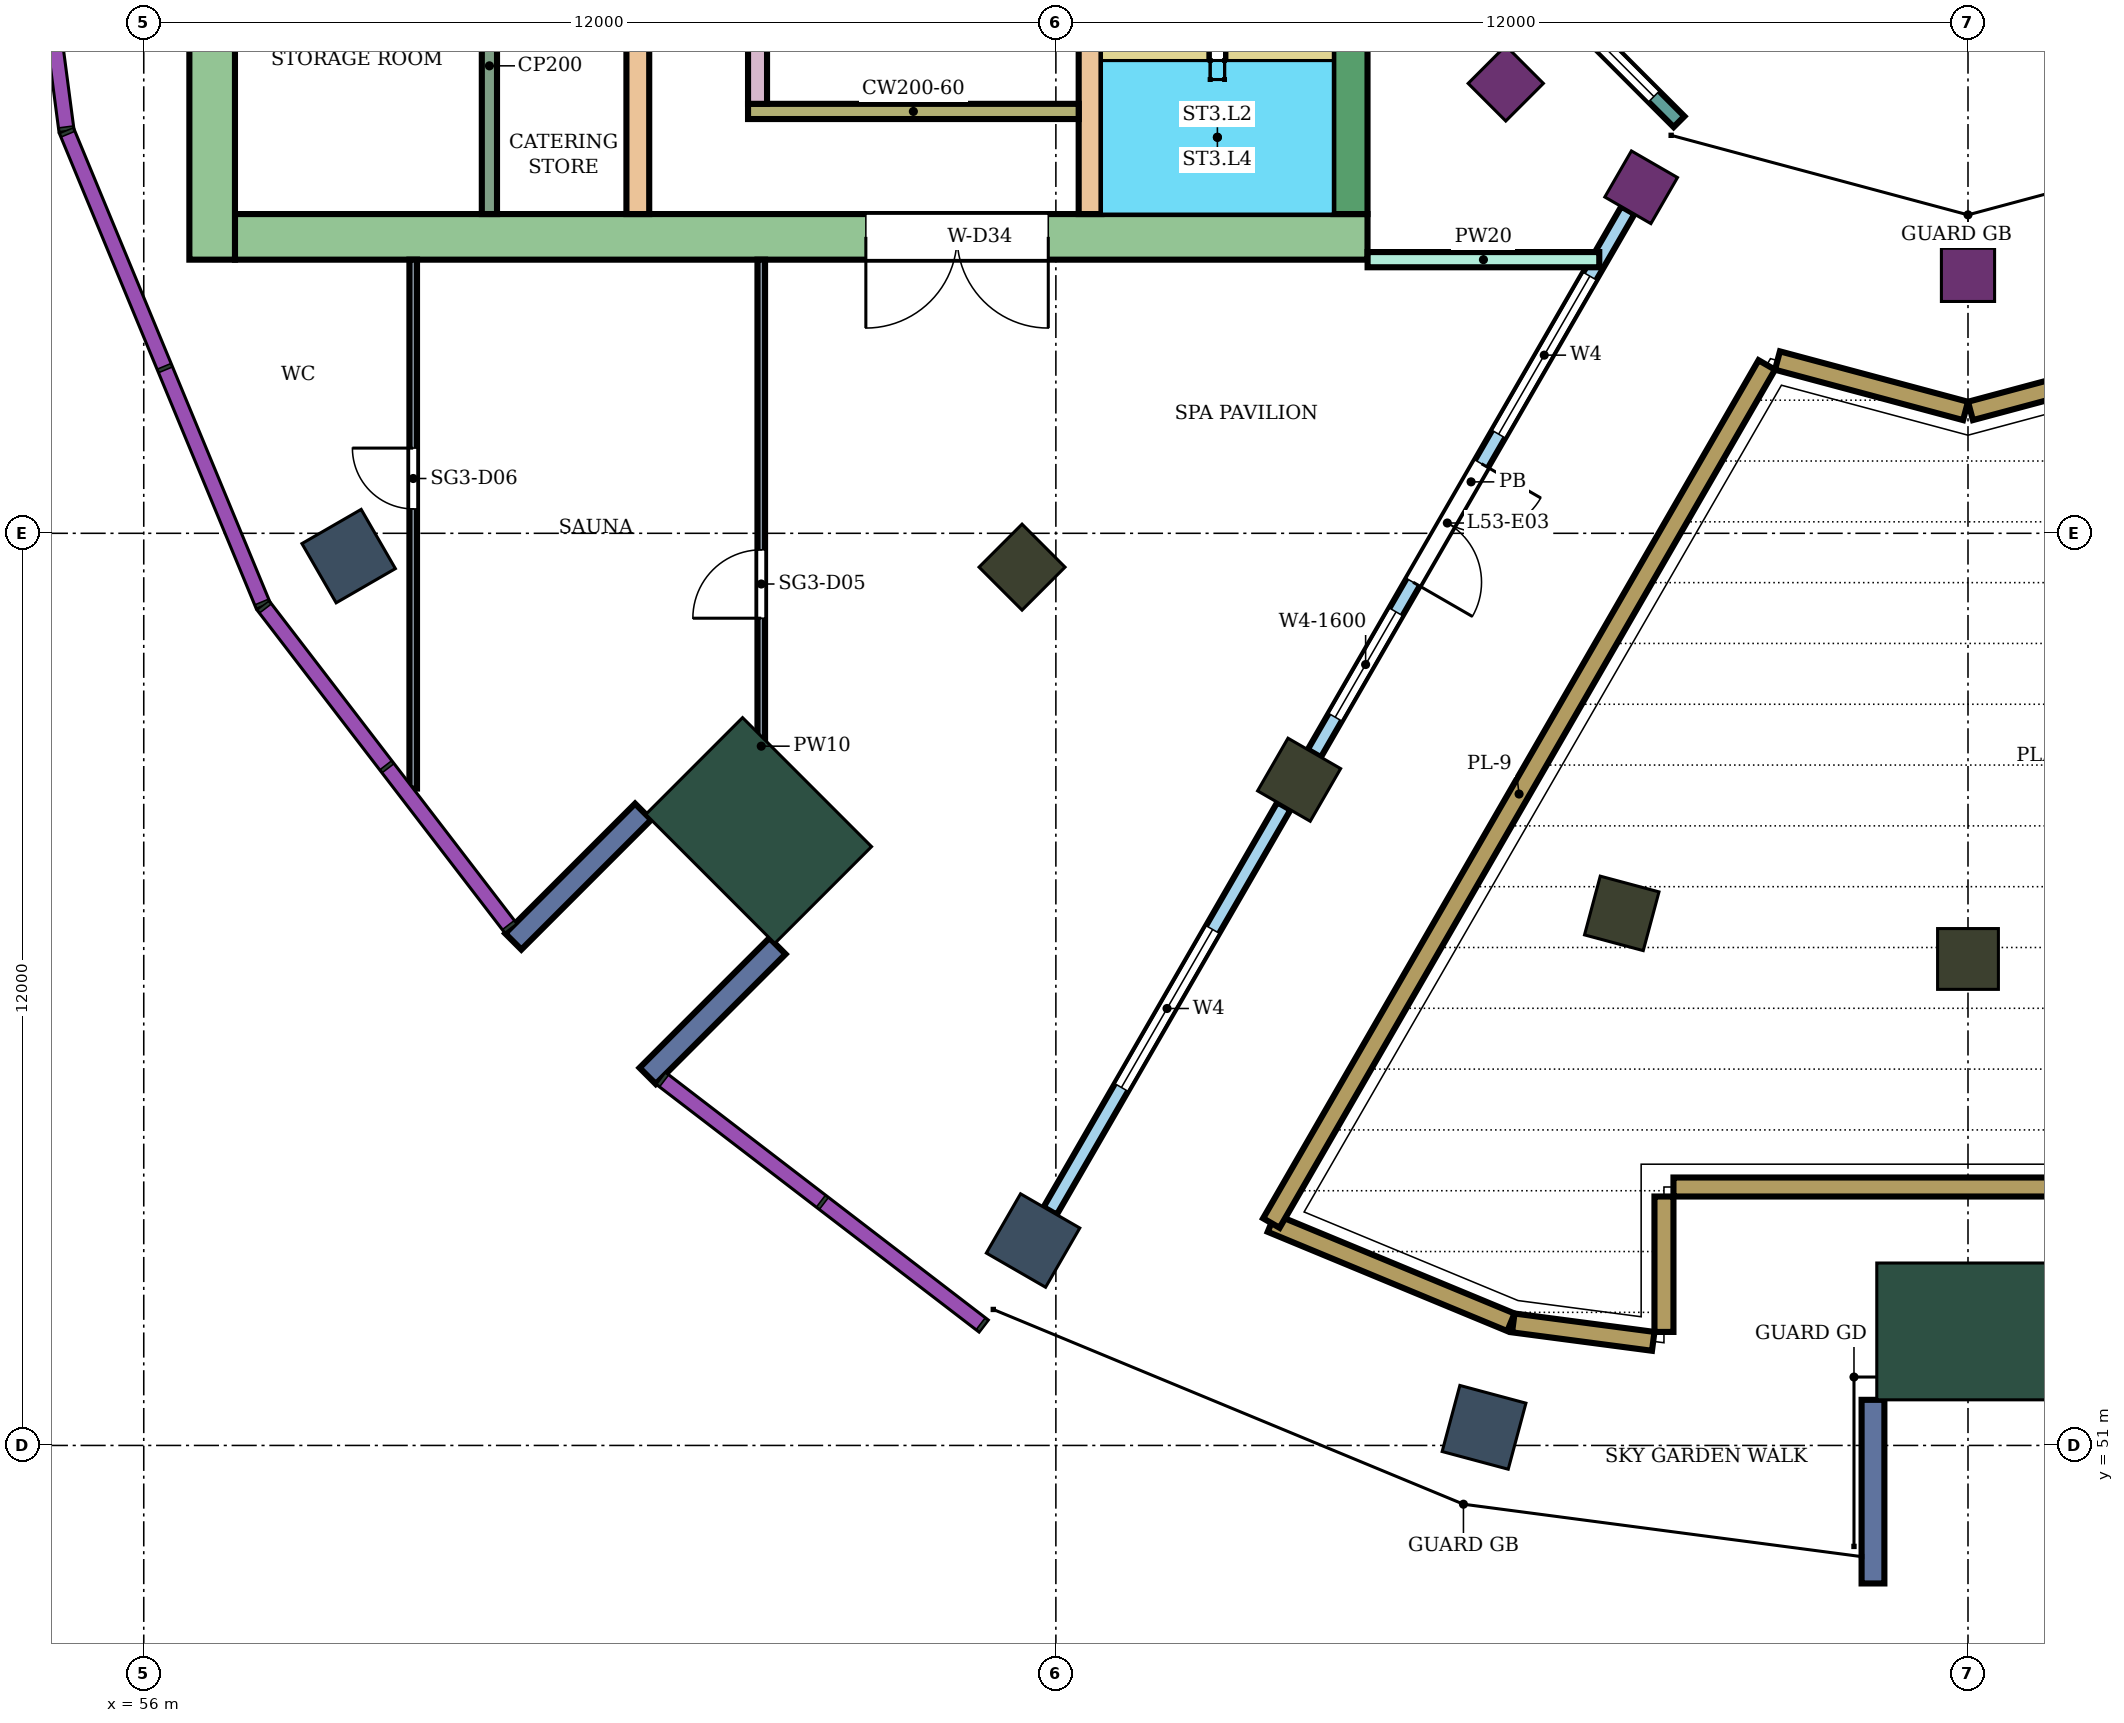
"""IFC4 building model, lengths in metres.
Left out: names, types, materials, properties, quantities, classifications, styles, units other than length and angle.
Written with IfcOpenShell. Run it as: python <this file> out.ifc"""

import sys

from ifc_helpers import new_model, si_unit, direction, frame, frame_2d, origin, origin_2d, place, context, subcontext, project, spatial, rectangle, extrude, element, fill, save


model = new_model("IFC4")
c1 = context("Model", 3, precision=1e-05, world=origin(), true_north=direction((0.0, 1.0)))
c2 = subcontext(c1, "Body", "Model", "MODEL_VIEW")
j1 = project(units=[si_unit("LENGTHUNIT", "METRE"), si_unit("PLANEANGLEUNIT", "RADIAN")], contexts=[c1])
p1 = place(None, origin())
s1 = spatial("IfcSite", under=j1, at=p1, CompositionType="ELEMENT")
p2 = place(p1, origin())
s2 = spatial("IfcBuilding", under=s1, at=p2, CompositionType="ELEMENT")
p3 = place(p2, frame((0.0, 0.0, 229.3)))
s3 = spatial("IfcBuildingStorey", under=s2, at=p3, CompositionType="ELEMENT", Elevation=229.3)
for number, where, z_axis, x_axis in (
    (1, (58.696, 62.7, 0.0), (0.0, 0.0, 1.0), (-0.866, -0.5, 0.0)),
    (2, (67.7, 53.696, 0.0), (0.0, 0.0, 1.0), (-0.5, -0.866, 0.0)),
    (3, (73.633, 51.238, 0.0), (0.0, 0.0, 1.0), (-0.259, -0.966, 0.0)),
):
    element("IfcColumn", number, at=place(p3, frame(where, z_axis=z_axis, x_axis=x_axis)), inside=s3, PredefinedType="COLUMN", context=c2, shape_type="SweptSolid", body=[
        extrude(rectangle(XDim=0.9, YDim=0.9, at=origin_2d()), origin(), (0.0, 0.0, 1.0), 8.0),
    ])
for number, where, z_axis, x_axis in (
    (4, (67.555, 62.555, 0.0), (0.0, 0.0, 1.0), (-0.707, -0.707, 0.0)),
    (5, (71.2, 59.758, 0.0), (0.0, 0.0, 1.0), (-0.5, -0.866, 0.0)),
    (6, (75.445, 58.0, 0.0), (0.0, 0.0, 1.0), (-0.259, -0.966, 0.0)),
    (7, (80.0, 57.4, 0.0), (0.0, 0.0, 1.0), (0.0, -1.0, 0.0)),
):
    element("IfcColumn", number, at=place(p3, frame(where, z_axis=z_axis, x_axis=x_axis)), inside=s3, PredefinedType="COLUMN", context=c2, shape_type="SweptSolid", body=[
        extrude(rectangle(XDim=0.8, YDim=0.8, at=origin_2d()), origin(), (0.0, 0.0, 1.0), 8.0),
    ])
for number, where, z_axis, x_axis in (
    (8, (73.919, 68.919, 0.0), (0.0, 0.0, 1.0), (-0.707, -0.707, 0.0)),
    (9, (75.7, 67.552, 0.0), (0.0, 0.0, 1.0), (-0.5, -0.866, 0.0)),
    (10, (80.0, 66.4, 0.0), (0.0, 0.0, 1.0), (0.0, -1.0, 0.0)),
):
    element("IfcColumn", number, at=place(p3, frame(where, z_axis=z_axis, x_axis=x_axis)), inside=s3, PredefinedType="COLUMN", context=c2, shape_type="SweptSolid", body=[
        extrude(rectangle(XDim=0.7, YDim=0.7, at=origin_2d()), origin(), (0.0, 0.0, 1.0), 8.0),
    ])
for number, where, z_axis, x_axis in (
    (11, (64.09, 59.09, 0.0), (0.0, 0.0, 1.0), (-0.707, -0.707, 0.0)),
    (12, (80.0, 52.5, 0.0), (0.0, 0.0, 1.0), (0.0, -1.0, 0.0)),
):
    element("IfcColumn", number, at=place(p3, frame(where, z_axis=z_axis, x_axis=x_axis)), inside=s3, PredefinedType="COLUMN", context=c2, shape_type="SweptSolid", body=[
        extrude(rectangle(XDim=1.8, YDim=2.4, at=origin_2d()), origin(), (0.0, 0.0, 1.0), 8.0),
    ])
p4 = place(p3, frame((72.1, 66.9, 0.0), z_axis=(0.0, 0.0, 1.0), x_axis=(-1.0, 0.0, 0.0)))
e13 = element("IfcWall", 13, at=p4, inside=s3, PredefinedType="SHEAR", context=c2, shape_type="SweptSolid", body=[
    extrude(rectangle(XDim=14.9, YDim=0.6, at=frame_2d((7.45, 0.0))), origin(), (0.0, 0.0, 1.0), 7.68),
])
p5 = place(p4, frame((4.2, 0.0, 0.0)))
e14 = element("IfcOpeningElement", 14, at=p5, cuts=e13, PredefinedType="OPENING", context=c2, shape_type="SweptSolid", body=[
    extrude(rectangle(XDim=2.4, YDim=2.4, at=frame_2d((1.2, 1.2))), frame((0.0, 0.31, 0.0), z_axis=(0.0, -1.0, 0.0), x_axis=(1.0, 0.0, 0.0)), (0.0, 0.0, 1.0), 0.62),
])
p6 = place(p3, frame((71.875, 75.0, 0.0), z_axis=(0.0, 0.0, 1.0), x_axis=(0.0, -1.0, 0.0)))
e15 = element("IfcWall", 15, at=p6, inside=s3, PredefinedType="SHEAR", context=c2, shape_type="SweptSolid", body=[
    extrude(rectangle(XDim=7.8, YDim=0.45, at=frame_2d((3.9, 0.0))), origin(), (0.0, 0.0, 1.0), 7.68),
])
p7 = place(p3, frame((56.9, 83.4, 0.0), z_axis=(0.0, 0.0, 1.0), x_axis=(0.0, -1.0, 0.0)))
e16 = element("IfcWall", 16, at=p7, inside=s3, PredefinedType="SHEAR", context=c2, shape_type="SweptSolid", body=[
    extrude(rectangle(XDim=16.8, YDim=0.6, at=frame_2d((8.4, 0.0))), origin(), (0.0, 0.0, 1.0), 7.68),
])
p8 = place(p3, frame((68.45, 75.0, 0.0), z_axis=(0.0, 0.0, 1.0), x_axis=(0.0, -1.0, 0.0)))
e17 = element("IfcWall", 17, at=p8, inside=s3, PredefinedType="SHEAR", context=c2, shape_type="SweptSolid", body=[
    extrude(rectangle(XDim=7.8, YDim=0.3, at=frame_2d((3.9, 0.0))), origin(), (0.0, 0.0, 1.0), 7.68),
])
p9 = place(p8, frame((1.85, 0.0, 0.0)))
e18 = element("IfcOpeningElement", 18, at=p9, cuts=e17, PredefinedType="OPENING", context=c2, shape_type="SweptSolid", body=[
    extrude(rectangle(XDim=0.9, YDim=2.1, at=frame_2d((0.45, 1.05))), frame((0.0, 0.16, 0.0), z_axis=(0.0, -1.0, 0.0), x_axis=(1.0, 0.0, 0.0)), (0.0, 0.0, 1.0), 0.32),
])
p10 = place(p3, frame((68.3, 68.55, 0.0), z_axis=(0.0, 0.0, 1.0), x_axis=(-1.0, 0.0, 0.0)))
e19 = element("IfcWall", 19, at=p10, inside=s3, PredefinedType="SHEAR", context=c2, shape_type="SweptSolid", body=[
    extrude(rectangle(XDim=4.35, YDim=0.2, at=frame_2d((2.175, 0.0))), origin(), (0.0, 0.0, 1.0), 7.68),
])
p11 = place(p3, frame((64.075, 71.45, 0.0), z_axis=(0.0, 0.0, 1.0), x_axis=(0.0, -1.0, 0.0)))
e20 = element("IfcWall", 20, at=p11, inside=s3, PredefinedType="SHEAR", context=c2, shape_type="SweptSolid", body=[
    extrude(rectangle(XDim=2.8, YDim=0.25, at=frame_2d((1.4, 0.0))), origin(), (0.0, 0.0, 1.0), 7.68),
])
p12 = place(p11, frame((0.95, 0.0, 0.0)))
e21 = element("IfcOpeningElement", 21, at=p12, cuts=e20, PredefinedType="OPENING", context=c2, shape_type="SweptSolid", body=[
    extrude(rectangle(XDim=0.9, YDim=2.1, at=frame_2d((0.45, 1.05))), frame((0.0, 0.135, 0.0), z_axis=(0.0, -1.0, 0.0), x_axis=(1.0, 0.0, 0.0)), (0.0, 0.0, 1.0), 0.27),
])
p13 = place(p3, frame((62.5, 71.4, 0.0), z_axis=(0.0, 0.0, 1.0), x_axis=(0.0, -1.0, 0.0)))
e22 = element("IfcWall", 22, at=p13, inside=s3, PredefinedType="SHEAR", context=c2, shape_type="SweptSolid", body=[
    extrude(rectangle(XDim=4.2, YDim=0.3, at=frame_2d((2.1, 0.0))), origin(), (0.0, 0.0, 1.0), 7.68),
])
for number, where, z_axis, x_axis in (
    (23, (62.57, 59.338, 0.0), (0.0, 0.0, 1.0), (-0.707, -0.707, 0.0)),
    (24, (64.338, 57.57, 0.0), (0.0, 0.0, 1.0), (-0.707, -0.707, 0.0)),
    (25, (78.75, 51.6, 0.0), (0.0, 0.0, 1.0), (0.0, -1.0, 0.0)),
):
    element("IfcWall", number, at=place(p3, frame(where, z_axis=z_axis, x_axis=x_axis)), inside=s3, PredefinedType="NOTDEFINED", context=c2, shape_type="SweptSolid", body=[
        extrude(rectangle(XDim=2.416, YDim=0.3, at=frame_2d((1.208, 0.0))), origin(), (0.0, 0.0, 1.0), 8.0),
    ])
p14 = place(p3, frame((73.415, 71.198, 0.0), z_axis=(0.0, 0.0, 1.0), x_axis=(0.707106781187, -0.707106781187, 0.0)))
e26 = element("IfcWall", 26, at=p14, inside=s3, PredefinedType="NOTDEFINED", context=c2, shape_type="SweptSolid", body=[
    extrude(rectangle(XDim=3.936, YDim=0.2, at=frame_2d((1.968, 0.0))), origin(), (0.0, 0.0, 1.0), 8.0),
])
p15 = place(p14, frame((0.468, 0.0, 0.9)))
e27 = element("IfcOpeningElement", 27, at=p15, cuts=e26, PredefinedType="OPENING", context=c2, shape_type="SweptSolid", body=[
    extrude(rectangle(XDim=3.0, YDim=2.3, at=frame_2d((1.5, 1.15))), frame((0.0, 0.11, 0.0), z_axis=(0.0, -1.0, 0.0), x_axis=(1.0, 0.0, 0.0)), (0.0, 0.0, 1.0), 0.22),
])
p16 = place(p3, frame((70.835, 53.926, 0.0), z_axis=(0.0, 0.0, 1.0), x_axis=(0.923871147788, -0.38270367425, 0.0)))
e28 = element("IfcWall", 28, at=p16, inside=s3, PredefinedType="USERDEFINED", context=c2, shape_type="SweptSolid", body=[
    extrude(rectangle(XDim=3.411, YDim=0.25, at=frame_2d((1.706, 0.0))), origin(), (0.0, 0.0, 1.0), 0.6),
])
p17 = place(p3, frame((74.018, 52.612, 0.0), z_axis=(0.0, 0.0, 1.0), x_axis=(0.991436829887, -0.130587182926, 0.0)))
e29 = element("IfcWall", 29, at=p17, inside=s3, PredefinedType="USERDEFINED", context=c2, shape_type="SweptSolid", body=[
    extrude(rectangle(XDim=1.856, YDim=0.25, at=frame_2d((0.928, 0.0))), origin(), (0.0, 0.0, 1.0), 0.6),
])
p18 = place(p3, frame((76.0, 52.493, 0.0), z_axis=(0.0, 0.0, 1.0), x_axis=(0.0, 1.0, 0.0)))
e30 = element("IfcWall", 30, at=p18, inside=s3, PredefinedType="USERDEFINED", context=c2, shape_type="SweptSolid", body=[
    extrude(rectangle(XDim=1.781, YDim=0.25, at=frame_2d((0.891, 0.0))), origin(), (0.0, 0.0, 1.0), 0.6),
])
p19 = place(p3, frame((76.125, 54.4, 0.0), z_axis=(0.0, 0.0, 1.0), x_axis=(1.0, 0.0, 0.0)))
e31 = element("IfcWall", 31, at=p19, inside=s3, PredefinedType="USERDEFINED", context=c2, shape_type="SweptSolid", body=[
    extrude(rectangle(XDim=7.75, YDim=0.25, at=frame_2d((3.875, 0.0))), origin(), (0.0, 0.0, 1.0), 0.6),
])
for number, where, z_axis, x_axis in (
    (32, (82.507, 65.273, 0.0), (0.0, 0.0, 1.0), (-0.966, -0.259, 0.0)),
    (33, (79.968, 64.61, 0.0), (0.0, 0.0, 1.0), (-0.966, 0.259, 0.0)),
):
    element("IfcWall", number, at=place(p3, frame(where, z_axis=z_axis, x_axis=x_axis)), inside=s3, PredefinedType="USERDEFINED", context=c2, shape_type="SweptSolid", body=[
        extrude(rectangle(XDim=2.562, YDim=0.25, at=frame_2d((1.281, 0.0))), origin(), (0.0, 0.0, 1.0), 0.6),
    ])
p20 = place(p3, frame((77.353, 65.215, 0.0), z_axis=(0.0, 0.0, 1.0), x_axis=(-0.499990498062, -0.866030889661, 0.0)))
e34 = element("IfcWall", 34, at=p20, inside=s3, PredefinedType="USERDEFINED", context=c2, shape_type="SweptSolid", body=[
    extrude(rectangle(XDim=13.035, YDim=0.25, at=frame_2d((6.518, 0.0))), origin(), (0.0, 0.0, 1.0), 0.6),
])
p21 = place(p3, frame((75.525, 67.249, 0.0), z_axis=(0.0, 0.0, 1.0), x_axis=(-0.499996545922, -0.866027397988, 0.0)))
e35 = element("IfcWall", 35, at=p21, inside=s3, PredefinedType="NOTDEFINED", context=c2, shape_type="SweptSolid", body=[
    extrude(rectangle(XDim=8.25, YDim=0.2, at=frame_2d((4.125, 0.0))), origin(), (0.0, 0.0, 1.0), 8.0),
])
p22 = place(p21, frame((1.0, 0.0, 0.3)))
e36 = element("IfcOpeningElement", 36, at=p22, cuts=e35, PredefinedType="OPENING", context=c2, shape_type="SweptSolid", body=[
    extrude(rectangle(XDim=2.4, YDim=3.6, at=frame_2d((1.2, 1.8))), frame((0.0, 0.11, 0.0), z_axis=(0.0, -1.0, 0.0), x_axis=(1.0, 0.0, 0.0)), (0.0, 0.0, 1.0), 0.22),
])
p23 = place(p21, frame((3.85, 0.0, 0.0)))
e37 = element("IfcOpeningElement", 37, at=p23, cuts=e35, PredefinedType="OPENING", context=c2, shape_type="SweptSolid", body=[
    extrude(rectangle(XDim=1.8, YDim=2.4, at=frame_2d((0.9, 1.2))), frame((0.0, 0.11, 0.0), z_axis=(0.0, -1.0, 0.0), x_axis=(1.0, 0.0, 0.0)), (0.0, 0.0, 1.0), 0.22),
])
p24 = place(p21, frame((6.1, 0.0, 0.3)))
e38 = element("IfcOpeningElement", 38, at=p24, cuts=e35, PredefinedType="OPENING", context=c2, shape_type="SweptSolid", body=[
    extrude(rectangle(XDim=1.6, YDim=3.6, at=frame_2d((0.8, 1.8))), frame((0.0, 0.11, 0.0), z_axis=(0.0, -1.0, 0.0), x_axis=(1.0, 0.0, 0.0)), (0.0, 0.0, 1.0), 0.22),
])
p25 = place(p3, frame((71.0, 59.412, 0.0), z_axis=(0.0, 0.0, 1.0), x_axis=(-0.499985903289, -0.866033542371, 0.0)))
e39 = element("IfcWall", 39, at=p25, inside=s3, PredefinedType="NOTDEFINED", context=c2, shape_type="SweptSolid", body=[
    extrude(rectangle(XDim=6.15, YDim=0.2, at=frame_2d((3.075, 0.0))), origin(), (0.0, 0.0, 1.0), 8.0),
])
p26 = place(p25, frame((1.875, 0.0, 0.3)))
e40 = element("IfcOpeningElement", 40, at=p26, cuts=e39, PredefinedType="OPENING", context=c2, shape_type="SweptSolid", body=[
    extrude(rectangle(XDim=2.4, YDim=3.6, at=frame_2d((1.2, 1.8))), frame((0.0, 0.11, 0.0), z_axis=(0.0, -1.0, 0.0), x_axis=(1.0, 0.0, 0.0)), (0.0, 0.0, 1.0), 0.22),
])
p27 = place(p3, frame((72.101, 66.6, 0.0), z_axis=(0.0, 0.0, 1.0), x_axis=(1.0, 0.0, 0.0)))
e41 = element("IfcWall", 41, at=p27, inside=s3, PredefinedType="PARTITIONING", context=c2, shape_type="SweptSolid", body=[
    extrude(rectangle(XDim=3.048, YDim=0.2, at=frame_2d((1.524, 0.0))), origin(), (0.0, 0.0, 1.0), 7.55),
])
p28 = place(p3, frame((59.545, 59.642, 0.0), z_axis=(0.0, 0.0, 1.0), x_axis=(0.0, 1.0, 0.0)))
e42 = element("IfcWall", 42, at=p28, inside=s3, PredefinedType="PARTITIONING", context=c2, shape_type="SweptSolid", body=[
    extrude(rectangle(XDim=6.958, YDim=0.1, at=frame_2d((3.479, 0.0))), origin(), (0.0, 0.0, 1.0), 7.55),
])
p29 = place(p28, frame((3.679, 0.0, 0.0)))
e43 = element("IfcOpeningElement", 43, at=p29, cuts=e42, PredefinedType="OPENING", context=c2, shape_type="SweptSolid", body=[
    extrude(rectangle(XDim=0.8, YDim=2.1, at=frame_2d((0.4, 1.05))), frame((0.0, 0.06, 0.0), z_axis=(0.0, -1.0, 0.0), x_axis=(1.0, 0.0, 0.0)), (0.0, 0.0, 1.0), 0.12),
])
p30 = place(p3, frame((64.124, 58.066, 0.0), z_axis=(0.0, 0.0, 1.0), x_axis=(0.0, 1.0, 0.0)))
e44 = element("IfcWall", 44, at=p30, inside=s3, PredefinedType="PARTITIONING", context=c2, shape_type="SweptSolid", body=[
    extrude(rectangle(XDim=8.534, YDim=0.1, at=frame_2d((4.267, 0.0))), origin(), (0.0, 0.0, 1.0), 7.55),
])
p31 = place(p30, frame((3.817, 0.0, 0.0)))
e45 = element("IfcOpeningElement", 45, at=p31, cuts=e44, PredefinedType="OPENING", context=c2, shape_type="SweptSolid", body=[
    extrude(rectangle(XDim=0.9, YDim=2.1, at=frame_2d((0.45, 1.05))), frame((0.0, 0.06, 0.0), z_axis=(0.0, -1.0, 0.0), x_axis=(1.0, 0.0, 0.0)), (0.0, 0.0, 1.0), 0.12),
])
p32 = place(p3, frame((60.548, 71.1, 0.0), z_axis=(0.0, 0.0, 1.0), x_axis=(0.0, -1.0, 0.0)))
e46 = element("IfcWall", 46, at=p32, inside=s3, PredefinedType="PARTITIONING", context=c2, shape_type="SweptSolid", body=[
    extrude(rectangle(XDim=3.9, YDim=0.2, at=frame_2d((1.95, 0.0))), origin(), (0.0, 0.0, 1.0), 7.68),
])
p33 = place(p15, origin())
e47 = element("IfcWindow", 47, at=p33, inside=s3, PartitioningType="SINGLE_PANEL", PredefinedType="WINDOW", context=c2, shape_type="SweptSolid", body=[
    extrude(rectangle(XDim=3.0, YDim=2.3, at=frame_2d((1.5, 1.15))), frame((0.0, 0.03, 0.0), z_axis=(0.0, -1.0, 0.0), x_axis=(1.0, 0.0, 0.0)), (0.0, 0.0, 1.0), 0.06),
])
fill(e27, e47)
p34 = place(p22, origin())
e48 = element("IfcWindow", 48, at=p34, inside=s3, PartitioningType="SINGLE_PANEL", PredefinedType="WINDOW", context=c2, shape_type="SweptSolid", body=[
    extrude(rectangle(XDim=2.4, YDim=3.6, at=frame_2d((1.2, 1.8))), frame((0.0, 0.03, 0.0), z_axis=(0.0, -1.0, 0.0), x_axis=(1.0, 0.0, 0.0)), (0.0, 0.0, 1.0), 0.06),
])
fill(e36, e48)
p35 = place(p23, origin())
e49 = element("IfcDoor", 49, at=p35, inside=s3, OperationType="DOUBLE_DOOR_SINGLE_SWING", PredefinedType="DOOR", context=c2, shape_type="SweptSolid", body=[
    extrude(rectangle(XDim=1.8, YDim=2.4, at=frame_2d((0.9, 1.2))), frame((0.0, 0.025, 0.0), z_axis=(0.0, -1.0, 0.0), x_axis=(1.0, 0.0, 0.0)), (0.0, 0.0, 1.0), 0.05),
])
fill(e37, e49)
p36 = place(p24, origin())
e50 = element("IfcWindow", 50, at=p36, inside=s3, PartitioningType="SINGLE_PANEL", PredefinedType="WINDOW", context=c2, shape_type="SweptSolid", body=[
    extrude(rectangle(XDim=1.6, YDim=3.6, at=frame_2d((0.8, 1.8))), frame((0.0, 0.03, 0.0), z_axis=(0.0, -1.0, 0.0), x_axis=(1.0, 0.0, 0.0)), (0.0, 0.0, 1.0), 0.06),
])
fill(e38, e50)
p37 = place(p26, origin())
e51 = element("IfcWindow", 51, at=p37, inside=s3, PartitioningType="SINGLE_PANEL", PredefinedType="WINDOW", context=c2, shape_type="SweptSolid", body=[
    extrude(rectangle(XDim=2.4, YDim=3.6, at=frame_2d((1.2, 1.8))), frame((0.0, 0.03, 0.0), z_axis=(0.0, -1.0, 0.0), x_axis=(1.0, 0.0, 0.0)), (0.0, 0.0, 1.0), 0.06),
])
fill(e40, e51)
p38 = place(p31, origin())
e52 = element("IfcDoor", 52, at=p38, inside=s3, OperationType="SINGLE_SWING_LEFT", PredefinedType="DOOR", context=c2, shape_type="SweptSolid", body=[
    extrude(rectangle(XDim=0.9, YDim=2.1, at=frame_2d((0.45, 1.05))), frame((0.0, 0.025, 0.0), z_axis=(0.0, -1.0, 0.0), x_axis=(1.0, 0.0, 0.0)), (0.0, 0.0, 1.0), 0.05),
])
fill(e45, e52)
p39 = place(p29, origin())
e53 = element("IfcDoor", 53, at=p39, inside=s3, OperationType="SINGLE_SWING_RIGHT", PredefinedType="DOOR", context=c2, shape_type="SweptSolid", body=[
    extrude(rectangle(XDim=0.8, YDim=2.1, at=frame_2d((0.4, 1.05))), frame((0.0, 0.025, 0.0), z_axis=(0.0, -1.0, 0.0), x_axis=(1.0, 0.0, 0.0)), (0.0, 0.0, 1.0), 0.05),
])
fill(e43, e53)
p40 = place(p5, origin())
e54 = element("IfcDoor", 54, at=p40, inside=s3, OperationType="DOUBLE_DOOR_SINGLE_SWING", PredefinedType="DOOR", context=c2, shape_type="SweptSolid", body=[
    extrude(rectangle(XDim=2.4, YDim=2.4, at=frame_2d((1.2, 1.2))), frame((0.0, 0.025, 0.0), z_axis=(0.0, -1.0, 0.0), x_axis=(1.0, 0.0, 0.0)), (0.0, 0.0, 1.0), 0.05),
])
fill(e14, e54)
save(model, sys.argv[1])
